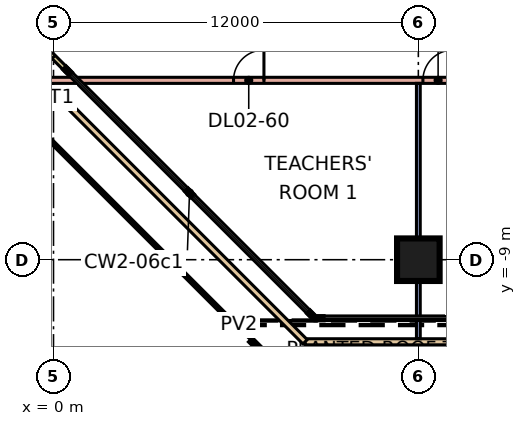
"""IFC4 building model, lengths in metres.
Left out: names, types, materials, properties, quantities, classifications, styles, units other than length and angle.
Written with IfcOpenShell. Run it as: python <this file> out.ifc"""

import sys

from ifc_helpers import new_model, si_unit, direction, frame, frame_2d, origin, origin_2d, place, context, subcontext, project, spatial, rectangle, extrude, element, fill, save


model = new_model("IFC4")
c1 = context("Model", 3, precision=1e-05, world=origin(), true_north=direction((0.0, 1.0)))
c2 = subcontext(c1, "Body", "Model", "MODEL_VIEW")
j1 = project(units=[si_unit("LENGTHUNIT", "METRE"), si_unit("PLANEANGLEUNIT", "RADIAN")], contexts=[c1])
p1 = place(None, origin())
s1 = spatial("IfcSite", under=j1, at=p1, CompositionType="ELEMENT")
p2 = place(p1, origin())
s2 = spatial("IfcBuilding", under=s1, at=p2, CompositionType="ELEMENT")
p3 = place(p2, frame((0.0, 0.0, 12.0)))
s3 = spatial("IfcBuildingStorey", under=s2, at=p3, CompositionType="ELEMENT", Elevation=12.0)
p4 = place(p3, frame((12.0, -9.0, 0.0), z_axis=(0.0, 0.0, 1.0), x_axis=(1.0, 0.0, 0.0)))
e1 = element("IfcColumn", 1, at=p4, inside=s3, PredefinedType="COLUMN", context=c2, shape_type="SweptSolid", body=[
    extrude(rectangle(XDim=1.4, YDim=1.4, at=origin_2d()), origin(), (0.0, 0.0, 1.0), 4.8),
])
p5 = place(p3, frame((-1.695, -0.634, 0.0), z_axis=(0.0, 0.0, 1.0), x_axis=(0.707106781187, -0.707106781187, 0.0)))
e2 = element("IfcWall", 2, at=p5, inside=s3, PredefinedType="SOLIDWALL", context=c2, shape_type="SweptSolid", body=[
    extrude(rectangle(XDim=3.0, YDim=0.15, at=frame_2d((1.5, 0.0))), origin(), (0.0, 0.0, 1.0), 4.4),
])
p6 = place(p5, frame((0.6, 0.0, 0.0)))
e3 = element("IfcOpeningElement", 3, at=p6, cuts=e2, PredefinedType="OPENING", context=c2, shape_type="SweptSolid", body=[
    extrude(rectangle(XDim=1.8, YDim=2.4, at=frame_2d((0.9, 1.2))), frame((0.0, 0.085, 0.0), z_axis=(0.0, -1.0, 0.0), x_axis=(1.0, 0.0, 0.0)), (0.0, 0.0, 1.0), 0.17),
])
p7 = place(p3, frame((74.725, -11.7, 0.0), z_axis=(0.0, 0.0, 1.0), x_axis=(-1.0, 0.0, 0.0)))
e4 = element("IfcWall", 4, at=p7, inside=s3, PredefinedType="PARAPET", context=c2, shape_type="SweptSolid", body=[
    extrude(rectangle(XDim=66.45, YDim=0.2, at=frame_2d((33.225, 0.0))), origin(), (0.0, 0.0, 1.0), 0.5),
])
p8 = place(p3, frame((8.275, -11.7, 0.0), z_axis=(0.0, 0.0, 1.0), x_axis=(-0.707106781187, 0.707106781187, 0.0)))
e5 = element("IfcWall", 5, at=p8, inside=s3, PredefinedType="PARAPET", context=c2, shape_type="SweptSolid", body=[
    extrude(rectangle(XDim=28.249, YDim=0.2, at=frame_2d((14.125, 0.0))), origin(), (0.0, 0.0, 1.0), 0.5),
])
p9 = place(p3, frame((-0.184, -3.1, 0.0), z_axis=(0.0, 0.0, 1.0), x_axis=(1.0, 0.0, 0.0)))
e6 = element("IfcWall", 6, at=p9, inside=s3, PredefinedType="PARTITIONING", context=c2, shape_type="SweptSolid", body=[
    extrude(rectangle(XDim=75.284, YDim=0.2, at=frame_2d((37.642, 0.0))), origin(), (0.0, 0.0, 1.0), 4.4),
])
p10 = place(p9, frame((6.105, 0.0, 0.0)))
e7 = element("IfcOpeningElement", 7, at=p10, cuts=e6, PredefinedType="OPENING", context=c2, shape_type="SweptSolid", body=[
    extrude(rectangle(XDim=1.0, YDim=2.1, at=frame_2d((0.5, 1.05))), frame((0.0, 0.11, 0.0), z_axis=(0.0, -1.0, 0.0), x_axis=(1.0, 0.0, 0.0)), (0.0, 0.0, 1.0), 0.22),
])
p11 = place(p9, frame((17.584, 0.0, 0.0)))
e8 = element("IfcOpeningElement", 8, at=p11, cuts=e6, PredefinedType="OPENING", context=c2, shape_type="SweptSolid", body=[
    extrude(rectangle(XDim=1.0, YDim=2.1, at=frame_2d((0.5, 1.05))), frame((0.0, 0.11, 0.0), z_axis=(0.0, -1.0, 0.0), x_axis=(1.0, 0.0, 0.0)), (0.0, 0.0, 1.0), 0.22),
])
p12 = place(p9, frame((12.334, 0.0, 0.0)))
e9 = element("IfcOpeningElement", 9, at=p12, cuts=e6, PredefinedType="OPENING", context=c2, shape_type="SweptSolid", body=[
    extrude(rectangle(XDim=1.0, YDim=2.1, at=frame_2d((0.5, 1.05))), frame((0.0, 0.11, 0.0), z_axis=(0.0, -1.0, 0.0), x_axis=(1.0, 0.0, 0.0)), (0.0, 0.0, 1.0), 0.22),
])
p13 = place(p9, frame((29.584, 0.0, 0.0)))
e10 = element("IfcOpeningElement", 10, at=p13, cuts=e6, PredefinedType="OPENING", context=c2, shape_type="SweptSolid", body=[
    extrude(rectangle(XDim=1.0, YDim=2.1, at=frame_2d((0.5, 1.05))), frame((0.0, 0.11, 0.0), z_axis=(0.0, -1.0, 0.0), x_axis=(1.0, 0.0, 0.0)), (0.0, 0.0, 1.0), 0.22),
])
p14 = place(p9, frame((24.334, 0.0, 0.0)))
e11 = element("IfcOpeningElement", 11, at=p14, cuts=e6, PredefinedType="OPENING", context=c2, shape_type="SweptSolid", body=[
    extrude(rectangle(XDim=1.0, YDim=2.1, at=frame_2d((0.5, 1.05))), frame((0.0, 0.11, 0.0), z_axis=(0.0, -1.0, 0.0), x_axis=(1.0, 0.0, 0.0)), (0.0, 0.0, 1.0), 0.22),
])
p15 = place(p9, frame((40.084, 0.0, 0.0)))
e12 = element("IfcOpeningElement", 12, at=p15, cuts=e6, PredefinedType="OPENING", context=c2, shape_type="SweptSolid", body=[
    extrude(rectangle(XDim=1.0, YDim=2.1, at=frame_2d((0.5, 1.05))), frame((0.0, 0.11, 0.0), z_axis=(0.0, -1.0, 0.0), x_axis=(1.0, 0.0, 0.0)), (0.0, 0.0, 1.0), 0.22),
])
p16 = place(p9, frame((49.084, 0.0, 0.0)))
e13 = element("IfcOpeningElement", 13, at=p16, cuts=e6, PredefinedType="OPENING", context=c2, shape_type="SweptSolid", body=[
    extrude(rectangle(XDim=1.0, YDim=2.1, at=frame_2d((0.5, 1.05))), frame((0.0, 0.11, 0.0), z_axis=(0.0, -1.0, 0.0), x_axis=(1.0, 0.0, 0.0)), (0.0, 0.0, 1.0), 0.22),
])
p17 = place(p9, frame((58.084, 0.0, 0.0)))
e14 = element("IfcOpeningElement", 14, at=p17, cuts=e6, PredefinedType="OPENING", context=c2, shape_type="SweptSolid", body=[
    extrude(rectangle(XDim=1.0, YDim=2.1, at=frame_2d((0.5, 1.05))), frame((0.0, 0.11, 0.0), z_axis=(0.0, -1.0, 0.0), x_axis=(1.0, 0.0, 0.0)), (0.0, 0.0, 1.0), 0.22),
])
p18 = place(p9, frame((67.084, 0.0, 0.0)))
e15 = element("IfcOpeningElement", 15, at=p18, cuts=e6, PredefinedType="OPENING", context=c2, shape_type="SweptSolid", body=[
    extrude(rectangle(XDim=1.0, YDim=2.1, at=frame_2d((0.5, 1.05))), frame((0.0, 0.11, 0.0), z_axis=(0.0, -1.0, 0.0), x_axis=(1.0, 0.0, 0.0)), (0.0, 0.0, 1.0), 0.22),
])
p19 = place(p9, frame((73.334, 0.0, 0.0)))
e16 = element("IfcOpeningElement", 16, at=p19, cuts=e6, PredefinedType="OPENING", context=c2, shape_type="SweptSolid", body=[
    extrude(rectangle(XDim=1.0, YDim=2.1, at=frame_2d((0.5, 1.05))), frame((0.0, 0.11, 0.0), z_axis=(0.0, -1.0, 0.0), x_axis=(1.0, 0.0, 0.0)), (0.0, 0.0, 1.0), 0.22),
])
p20 = place(p3, frame((12.0, -11.6, 0.0), z_axis=(0.0, 0.0, 1.0), x_axis=(0.0, 1.0, 0.0)))
e17 = element("IfcWall", 17, at=p20, inside=s3, PredefinedType="PARTITIONING", context=c2, shape_type="SweptSolid", body=[
    extrude(rectangle(XDim=8.4, YDim=0.125, at=frame_2d((4.2, 0.0))), origin(), (0.0, 0.0, 1.0), 4.4),
])
p21 = place(p6, frame((1.8, 0.0, 0.0), z_axis=(0.0, 0.0, 1.0), x_axis=(-1.0, 0.0, 0.0)))
e18 = element("IfcDoor", 18, at=p21, inside=s3, OperationType="DOUBLE_DOOR_SINGLE_SWING", PredefinedType="DOOR", context=c2, shape_type="SweptSolid", body=[
    extrude(rectangle(XDim=1.8, YDim=2.4, at=frame_2d((0.9, 1.2))), frame((0.0, 0.025, 0.0), z_axis=(0.0, -1.0, 0.0), x_axis=(1.0, 0.0, 0.0)), (0.0, 0.0, 1.0), 0.05),
])
fill(e3, e18)
p22 = place(p10, frame((1.0, 0.0, 0.0), z_axis=(0.0, 0.0, 1.0), x_axis=(-1.0, 0.0, 0.0)))
e19 = element("IfcDoor", 19, at=p22, inside=s3, OperationType="SINGLE_SWING_RIGHT", PredefinedType="DOOR", context=c2, shape_type="SweptSolid", body=[
    extrude(rectangle(XDim=1.0, YDim=2.1, at=frame_2d((0.5, 1.05))), frame((0.0, 0.025, 0.0), z_axis=(0.0, -1.0, 0.0), x_axis=(1.0, 0.0, 0.0)), (0.0, 0.0, 1.0), 0.05),
])
fill(e7, e19)
p23 = place(p12, frame((1.0, 0.0, 0.0), z_axis=(0.0, 0.0, 1.0), x_axis=(-1.0, 0.0, 0.0)))
e20 = element("IfcDoor", 20, at=p23, inside=s3, OperationType="SINGLE_SWING_RIGHT", PredefinedType="DOOR", context=c2, shape_type="SweptSolid", body=[
    extrude(rectangle(XDim=1.0, YDim=2.1, at=frame_2d((0.5, 1.05))), frame((0.0, 0.025, 0.0), z_axis=(0.0, -1.0, 0.0), x_axis=(1.0, 0.0, 0.0)), (0.0, 0.0, 1.0), 0.05),
])
fill(e9, e20)
save(model, sys.argv[1])
